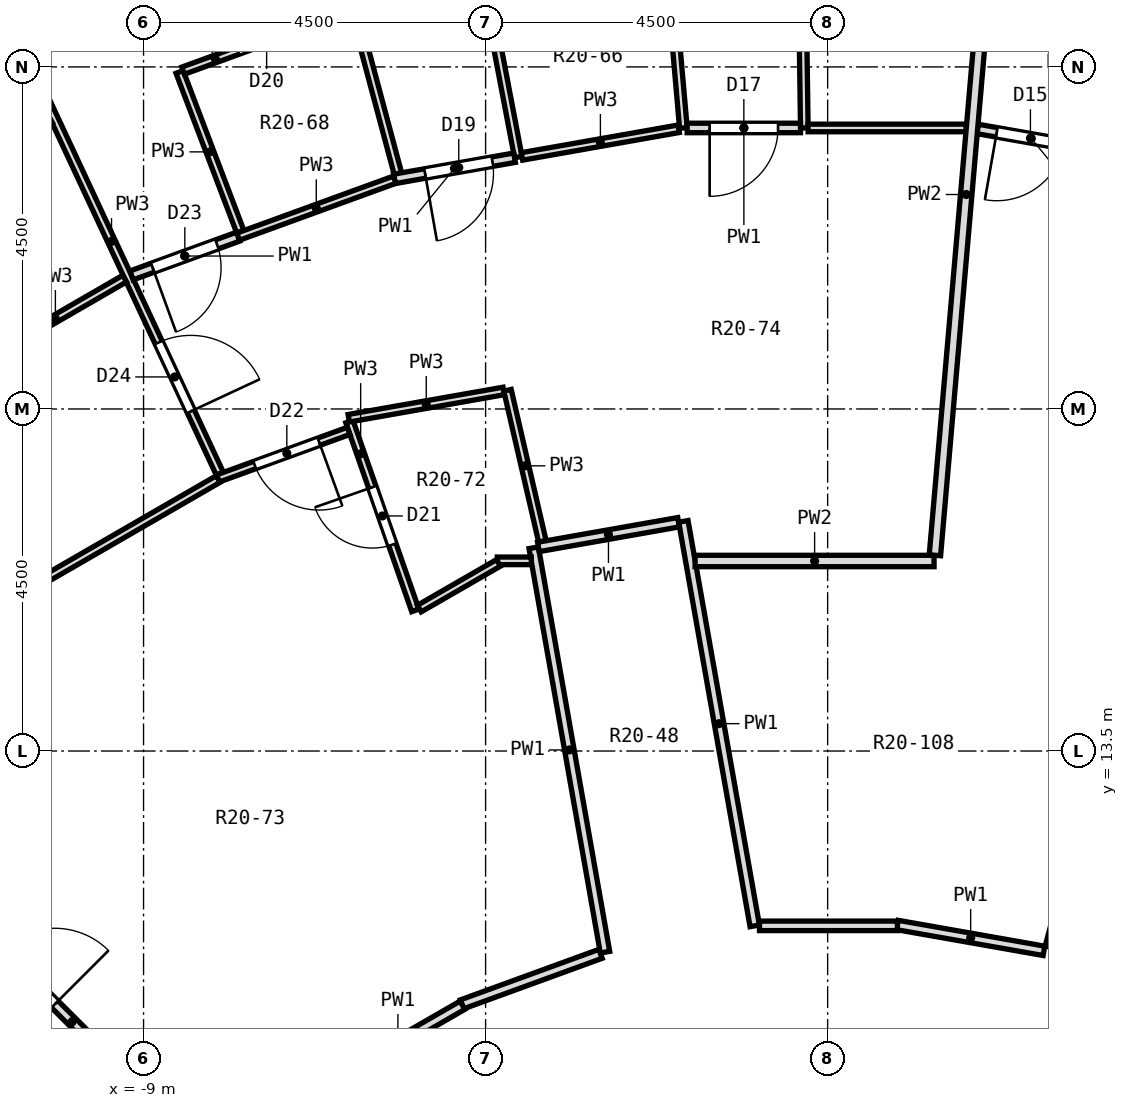
"""IFC4 building model, lengths in metres.
Left out: names, types, materials, properties, quantities, classifications, styles, units other than length and angle.
Written with IfcOpenShell. Run it as: python <this file> out.ifc"""

import sys

from ifc_helpers import new_model, si_unit, direction, frame, frame_2d, origin, place, context, subcontext, project, spatial, rectangle, extrude, element, fill, save


model = new_model("IFC4")
c1 = context("Model", 3, precision=1e-05, world=origin(), true_north=direction((0.0, 1.0)))
c2 = subcontext(c1, "Body", "Model", "MODEL_VIEW")
j1 = project(units=[si_unit("LENGTHUNIT", "METRE"), si_unit("PLANEANGLEUNIT", "RADIAN")], contexts=[c1])
p1 = place(None, origin())
s1 = spatial("IfcSite", under=j1, at=p1, CompositionType="ELEMENT")
p2 = place(p1, origin())
s2 = spatial("IfcBuilding", under=s1, at=p2, CompositionType="ELEMENT")
p3 = place(p2, frame((0.0, 0.0, 121.6)))
s3 = spatial("IfcBuildingStorey", under=s2, at=p3, CompositionType="ELEMENT", Elevation=121.6)
p4 = place(p3, frame((-0.339, 23.997, 0.0), z_axis=(0.0, 0.0, 1.0), x_axis=(0.014009876351, -0.999901856866, 0.0)))
e1 = element("IfcWall", 1, at=p4, inside=s3, PredefinedType="PARTITIONING", context=c2, shape_type="SweptSolid", body=[
    extrude(rectangle(XDim=2.3, YDim=0.1, at=frame_2d((1.15, 0.0))), origin(), (0.0, 0.0, 1.0), 2.8),
])
p5 = place(p3, frame((-2.237, 25.567, 0.0), z_axis=(0.0, 0.0, 1.0), x_axis=(0.087283097701, -0.996183547774, 0.0)))
e2 = element("IfcWall", 2, at=p5, inside=s3, PredefinedType="PARTITIONING", context=c2, shape_type="SweptSolid", body=[
    extrude(rectangle(XDim=3.885, YDim=0.1, at=frame_2d((1.943, 0.0))), origin(), (0.0, 0.0, 1.0), 2.8),
])
p6 = place(p3, frame((-3.867, 16.174, 0.0), z_axis=(0.0, 0.0, 1.0), x_axis=(0.173602314867, -0.98481583876, 0.0)))
e3 = element("IfcWall", 3, at=p6, inside=s3, PredefinedType="PARTITIONING", context=c2, shape_type="SweptSolid", body=[
    extrude(rectangle(XDim=5.403, YDim=0.125, at=frame_2d((2.702, 0.0))), origin(), (0.0, 0.0, 1.0), 2.8),
])
p7 = place(p3, frame((-1.898, 16.521, 0.0), z_axis=(0.0, 0.0, 1.0), x_axis=(0.173777601074, -0.984784923405, 0.0)))
e4 = element("IfcWall", 4, at=p7, inside=s3, PredefinedType="PARTITIONING", context=c2, shape_type="SweptSolid", body=[
    extrude(rectangle(XDim=5.403, YDim=0.125, at=frame_2d((2.702, 0.0))), origin(), (0.0, 0.0, 1.0), 2.8),
])
p8 = place(p3, frame((-4.501, 23.574, 0.0), z_axis=(0.0, 0.0, 1.0), x_axis=(0.187292523019, -0.982304184467, 0.0)))
e5 = element("IfcWall", 5, at=p8, inside=s3, PredefinedType="PARTITIONING", context=c2, shape_type="SweptSolid", body=[
    extrude(rectangle(XDim=2.301, YDim=0.1, at=frame_2d((1.15, 0.0))), origin(), (0.0, 0.0, 1.0), 2.8),
])
p9 = place(p3, frame((-4.212, 18.246, 0.0), z_axis=(0.0, 0.0, 1.0), x_axis=(0.224815815327, -0.974401277287, 0.0)))
e6 = element("IfcWall", 6, at=p9, inside=s3, PredefinedType="PARTITIONING", context=c2, shape_type="SweptSolid", body=[
    extrude(rectangle(XDim=2.041, YDim=0.1, at=frame_2d((1.02, 0.0))), origin(), (0.0, 0.0, 1.0), 2.8),
])
p10 = place(p3, frame((-6.643, 24.791, 0.0), z_axis=(0.0, 0.0, 1.0), x_axis=(0.258530300991, -0.966003148789, 0.0)))
e7 = element("IfcWall", 7, at=p10, inside=s3, PredefinedType="PARTITIONING", context=c2, shape_type="SweptSolid", body=[
    extrude(rectangle(XDim=3.835, YDim=0.1, at=frame_2d((1.917, 0.0))), origin(), (0.0, 0.0, 1.0), 2.8),
])
p11 = place(p3, frame((-6.292, 17.835, 0.0), z_axis=(0.0, 0.0, 1.0), x_axis=(0.329581778564, -0.944127031304, 0.0)))
e8 = element("IfcWall", 8, at=p11, inside=s3, PredefinedType="PARTITIONING", context=c2, shape_type="SweptSolid", body=[
    extrude(rectangle(XDim=2.632, YDim=0.1, at=frame_2d((1.316, 0.0))), origin(), (0.0, 0.0, 1.0), 2.8),
])
p12 = place(p11, frame((0.916, 0.0, 0.0)))
e9 = element("IfcOpeningElement", 9, at=p12, cuts=e8, PredefinedType="OPENING", context=c2, shape_type="SweptSolid", body=[
    extrude(rectangle(XDim=0.8, YDim=2.1, at=frame_2d((0.4, 1.05))), frame((0.0, 0.062, 0.0), z_axis=(0.0, -1.0, 0.0), x_axis=(1.0, 0.0, 0.0)), (0.0, 0.0, 1.0), 0.124),
])
p13 = place(p3, frame((-8.526, 22.434, 0.0), z_axis=(0.0, 0.0, 1.0), x_axis=(0.355151387301, -0.934808799754, 0.0)))
e10 = element("IfcWall", 10, at=p13, inside=s3, PredefinedType="PARTITIONING", context=c2, shape_type="SweptSolid", body=[
    extrude(rectangle(XDim=2.25, YDim=0.1, at=frame_2d((1.125, 0.0))), origin(), (0.0, 0.0, 1.0), 2.8),
])
p14 = place(p3, frame((-10.846, 23.26, 0.0), z_axis=(0.0, 0.0, 1.0), x_axis=(0.422617898312, -0.906307956506, 0.0)))
e11 = element("IfcWall", 11, at=p14, inside=s3, PredefinedType="PARTITIONING", context=c2, shape_type="SweptSolid", body=[
    extrude(rectangle(XDim=6.744, YDim=0.1, at=frame_2d((3.372, 0.0))), origin(), (0.0, 0.0, 1.0), 2.8),
])
p15 = place(p14, frame((4.839, 0.0, 0.0)))
e12 = element("IfcOpeningElement", 12, at=p15, cuts=e11, PredefinedType="OPENING", context=c2, shape_type="SweptSolid", body=[
    extrude(rectangle(XDim=1.0, YDim=2.1, at=frame_2d((0.5, 1.05))), frame((0.0, 0.062, 0.0), z_axis=(0.0, -1.0, 0.0), x_axis=(1.0, 0.0, 0.0)), (0.0, 0.0, 1.0), 0.124),
])
p16 = place(p3, frame((-13.086, 13.086, 0.0), z_axis=(0.0, 0.0, 1.0), x_axis=(0.707208486583, -0.707005061159, 0.0)))
e13 = element("IfcWall", 13, at=p16, inside=s3, PredefinedType="PARTITIONING", context=c2, shape_type="SweptSolid", body=[
    extrude(rectangle(XDim=7.201, YDim=0.125, at=frame_2d((3.601, 0.0))), origin(), (0.0, 0.0, 1.0), 2.8),
])
p17 = place(p16, frame((3.126, 0.0, 0.0)))
e14 = element("IfcOpeningElement", 14, at=p17, cuts=e13, PredefinedType="OPENING", context=c2, shape_type="SweptSolid", body=[
    extrude(rectangle(XDim=1.0, YDim=2.1, at=frame_2d((0.5, 1.05))), frame((0.0, 0.074, 0.0), z_axis=(0.0, -1.0, 0.0), x_axis=(1.0, 0.0, 0.0)), (0.0, 0.0, 1.0), 0.149),
])
p18 = place(p3, frame((0.917, 11.211, 0.0), z_axis=(0.0, 0.0, 1.0), x_axis=(0.984842502131, -0.173450990183, 0.0)))
e15 = element("IfcWall", 15, at=p18, inside=s3, PredefinedType="PARTITIONING", context=c2, shape_type="SweptSolid", body=[
    extrude(rectangle(XDim=1.958, YDim=0.125, at=frame_2d((0.979, 0.0))), origin(), (0.0, 0.0, 1.0), 2.8),
])
p19 = place(p3, frame((1.972, 21.684, 0.0), z_axis=(0.0, 0.0, 1.0), x_axis=(0.984843298649, -0.173446467555, 0.0)))
e16 = element("IfcWall", 16, at=p19, inside=s3, PredefinedType="PARTITIONING", context=c2, shape_type="SweptSolid", body=[
    extrude(rectangle(XDim=1.438, YDim=0.125, at=frame_2d((0.719, 0.0))), origin(), (0.0, 0.0, 1.0), 2.8),
])
p20 = place(p19, frame((0.257, 0.0, 0.0)))
e17 = element("IfcOpeningElement", 17, at=p20, cuts=e16, PredefinedType="OPENING", context=c2, shape_type="SweptSolid", body=[
    extrude(rectangle(XDim=0.9, YDim=2.1, at=frame_2d((0.45, 1.05))), frame((0.0, 0.074, 0.0), z_axis=(0.0, -1.0, 0.0), x_axis=(1.0, 0.0, 0.0)), (0.0, 0.0, 1.0), 0.149),
])
p21 = place(p3, frame((-0.896, 11.2, 0.0), z_axis=(0.0, 0.0, 1.0), x_axis=(1.0, 0.0, 0.0)))
e18 = element("IfcWall", 18, at=p21, inside=s3, PredefinedType="PARTITIONING", context=c2, shape_type="SweptSolid", body=[
    extrude(rectangle(XDim=1.814, YDim=0.125, at=frame_2d((0.907, 0.0))), origin(), (0.0, 0.0, 1.0), 2.8),
])
p22 = place(p3, frame((-4.346, 16.002, 0.0), z_axis=(0.0, 0.0, 1.0), x_axis=(1.0, 0.0, 0.0)))
e19 = element("IfcWall", 19, at=p22, inside=s3, PredefinedType="PARTITIONING", context=c2, shape_type="SweptSolid", body=[
    extrude(rectangle(XDim=0.447, YDim=0.1, at=frame_2d((0.223, 0.0))), origin(), (0.0, 0.0, 1.0), 2.8),
])
p23 = place(p3, frame((-1.743, 16.0, 0.0), z_axis=(0.0, 0.0, 1.0), x_axis=(1.0, 0.0, 0.0)))
e20 = element("IfcWall", 20, at=p23, inside=s3, PredefinedType="PARTITIONING", context=c2, shape_type="SweptSolid", body=[
    extrude(rectangle(XDim=3.143, YDim=0.15, at=frame_2d((1.572, 0.0))), origin(), (0.0, 0.0, 1.0), 2.8),
])
p24 = place(p3, frame((-0.257, 21.697, 0.0), z_axis=(0.0, 0.0, 1.0), x_axis=(1.0, 0.0, 0.0)))
e21 = element("IfcWall", 21, at=p24, inside=s3, PredefinedType="PARTITIONING", context=c2, shape_type="SweptSolid", body=[
    extrude(rectangle(XDim=2.08, YDim=0.1, at=frame_2d((1.04, 0.0))), origin(), (0.0, 0.0, 1.0), 2.8),
])
p25 = place(p3, frame((-1.848, 21.697, 0.0), z_axis=(0.0, 0.0, 1.0), x_axis=(1.0, 0.0, 0.0)))
e22 = element("IfcWall", 22, at=p25, inside=s3, PredefinedType="PARTITIONING", context=c2, shape_type="SweptSolid", body=[
    extrude(rectangle(XDim=1.491, YDim=0.125, at=frame_2d((0.746, 0.0))), origin(), (0.0, 0.0, 1.0), 2.8),
])
p26 = place(p25, frame((0.295, 0.0, 0.0)))
e23 = element("IfcOpeningElement", 23, at=p26, cuts=e22, PredefinedType="OPENING", context=c2, shape_type="SweptSolid", body=[
    extrude(rectangle(XDim=0.9, YDim=2.1, at=frame_2d((0.45, 1.05))), frame((0.0, 0.074, 0.0), z_axis=(0.0, -1.0, 0.0), x_axis=(1.0, 0.0, 0.0)), (0.0, 0.0, 1.0), 0.149),
])
p27 = place(p3, frame((-3.805, 16.185, 0.0), z_axis=(0.0, 0.0, 1.0), x_axis=(0.984829460828, 0.173525021494, 0.0)))
e24 = element("IfcWall", 24, at=p27, inside=s3, PredefinedType="PARTITIONING", context=c2, shape_type="SweptSolid", body=[
    extrude(rectangle(XDim=1.873, YDim=0.125, at=frame_2d((0.936, 0.0))), origin(), (0.0, 0.0, 1.0), 2.8),
])
p28 = place(p3, frame((-6.3, 17.878, 0.0), z_axis=(0.0, 0.0, 1.0), x_axis=(0.984823916484, 0.173556485102, 0.0)))
e25 = element("IfcWall", 25, at=p28, inside=s3, PredefinedType="PARTITIONING", context=c2, shape_type="SweptSolid", body=[
    extrude(rectangle(XDim=2.069, YDim=0.1, at=frame_2d((1.035, 0.0))), origin(), (0.0, 0.0, 1.0), 2.8),
])
p29 = place(p3, frame((-4.021, 21.323, 0.0), z_axis=(0.0, 0.0, 1.0), x_axis=(0.984822285077, 0.173565742058, 0.0)))
e26 = element("IfcWall", 26, at=p29, inside=s3, PredefinedType="PARTITIONING", context=c2, shape_type="SweptSolid", body=[
    extrude(rectangle(XDim=2.093, YDim=0.1, at=frame_2d((1.046, 0.0))), origin(), (0.0, 0.0, 1.0), 2.8),
])
p30 = place(p3, frame((-5.699, 21.027, 0.0), z_axis=(0.0, 0.0, 1.0), x_axis=(0.984843235948, 0.173446823572, 0.0)))
e27 = element("IfcWall", 27, at=p30, inside=s3, PredefinedType="PARTITIONING", context=c2, shape_type="SweptSolid", body=[
    extrude(rectangle(XDim=1.605, YDim=0.125, at=frame_2d((0.802, 0.0))), origin(), (0.0, 0.0, 1.0), 2.8),
])
p31 = place(p30, frame((0.409, 0.0, 0.0)))
e28 = element("IfcOpeningElement", 28, at=p31, cuts=e27, PredefinedType="OPENING", context=c2, shape_type="SweptSolid", body=[
    extrude(rectangle(XDim=0.9, YDim=2.1, at=frame_2d((0.45, 1.05))), frame((0.0, 0.074, 0.0), z_axis=(0.0, -1.0, 0.0), x_axis=(1.0, 0.0, 0.0)), (0.0, 0.0, 1.0), 0.149),
])
p32 = place(p3, frame((-4.811, 10.167, 0.0), z_axis=(0.0, 0.0, 1.0), x_axis=(0.939506513074, 0.34253103785, 0.0)))
e29 = element("IfcWall", 29, at=p32, inside=s3, PredefinedType="PARTITIONING", context=c2, shape_type="SweptSolid", body=[
    extrude(rectangle(XDim=1.94, YDim=0.125, at=frame_2d((0.97, 0.0))), origin(), (0.0, 0.0, 1.0), 2.8),
])
p33 = place(p3, frame((-8.023, 17.086, 0.0), z_axis=(0.0, 0.0, 1.0), x_axis=(0.93970385633, 0.341989272345, 0.0)))
e30 = element("IfcWall", 30, at=p33, inside=s3, PredefinedType="PARTITIONING", context=c2, shape_type="SweptSolid", body=[
    extrude(rectangle(XDim=1.831, YDim=0.1, at=frame_2d((0.916, 0.0))), origin(), (0.0, 0.0, 1.0), 2.8),
])
p34 = place(p33, frame((0.516, 0.0, 0.0)))
e31 = element("IfcOpeningElement", 31, at=p34, cuts=e30, PredefinedType="OPENING", context=c2, shape_type="SweptSolid", body=[
    extrude(rectangle(XDim=0.9, YDim=2.1, at=frame_2d((0.45, 1.05))), frame((0.0, 0.062, 0.0), z_axis=(0.0, -1.0, 0.0), x_axis=(1.0, 0.0, 0.0)), (0.0, 0.0, 1.0), 0.124),
])
p35 = place(p3, frame((-7.759, 20.265, 0.0), z_axis=(0.0, 0.0, 1.0), x_axis=(0.9397154993, 0.341957278581, 0.0)))
e32 = element("IfcWall", 32, at=p35, inside=s3, PredefinedType="PARTITIONING", context=c2, shape_type="SweptSolid", body=[
    extrude(rectangle(XDim=2.196, YDim=0.1, at=frame_2d((1.098, 0.0))), origin(), (0.0, 0.0, 1.0), 2.8),
])
p36 = place(p3, frame((-9.158, 19.757, 0.0), z_axis=(0.0, 0.0, 1.0), x_axis=(0.939793423488, 0.341743063087, 0.0)))
e33 = element("IfcWall", 33, at=p36, inside=s3, PredefinedType="PARTITIONING", context=c2, shape_type="SweptSolid", body=[
    extrude(rectangle(XDim=1.492, YDim=0.125, at=frame_2d((0.746, 0.0))), origin(), (0.0, 0.0, 1.0), 2.8),
])
p37 = place(p36, frame((0.296, 0.0, 0.0)))
e34 = element("IfcOpeningElement", 34, at=p37, cuts=e33, PredefinedType="OPENING", context=c2, shape_type="SweptSolid", body=[
    extrude(rectangle(XDim=0.9, YDim=2.1, at=frame_2d((0.45, 1.05))), frame((0.0, 0.074, 0.0), z_axis=(0.0, -1.0, 0.0), x_axis=(1.0, 0.0, 0.0)), (0.0, 0.0, 1.0), 0.149),
])
p38 = place(p3, frame((-8.479, 22.451, 0.0), z_axis=(0.0, 0.0, 1.0), x_axis=(0.939671413828, 0.342078403345, 0.0)))
e35 = element("IfcWall", 35, at=p38, inside=s3, PredefinedType="PARTITIONING", context=c2, shape_type="SweptSolid", body=[
    extrude(rectangle(XDim=2.338, YDim=0.1, at=frame_2d((1.169, 0.0))), origin(), (0.0, 0.0, 1.0), 2.8),
])
p39 = place(p38, frame((0.769, 0.0, 0.0)))
e36 = element("IfcOpeningElement", 36, at=p39, cuts=e35, PredefinedType="OPENING", context=c2, shape_type="SweptSolid", body=[
    extrude(rectangle(XDim=0.8, YDim=2.1, at=frame_2d((0.4, 1.05))), frame((0.0, 0.062, 0.0), z_axis=(0.0, -1.0, 0.0), x_axis=(1.0, 0.0, 0.0)), (0.0, 0.0, 1.0), 0.124),
])
p40 = place(p3, frame((-6.502, 9.177, 0.0), z_axis=(0.0, 0.0, 1.0), x_axis=(0.866328596722, 0.499474486338, 0.0)))
e37 = element("IfcWall", 37, at=p40, inside=s3, PredefinedType="PARTITIONING", context=c2, shape_type="SweptSolid", body=[
    extrude(rectangle(XDim=1.96, YDim=0.125, at=frame_2d((0.98, 0.0))), origin(), (0.0, 0.0, 1.0), 2.8),
])
p41 = place(p3, frame((-5.372, 15.374, 0.0), z_axis=(0.0, 0.0, 1.0), x_axis=(0.866111216017, 0.499851339389, 0.0)))
e38 = element("IfcWall", 38, at=p41, inside=s3, PredefinedType="PARTITIONING", context=c2, shape_type="SweptSolid", body=[
    extrude(rectangle(XDim=1.202, YDim=0.1, at=frame_2d((0.601, 0.0))), origin(), (0.0, 0.0, 1.0), 2.8),
])
p42 = place(p3, frame((-10.868, 15.433, 0.0), z_axis=(0.0, 0.0, 1.0), x_axis=(0.866020017222, 0.500009329683, 0.0)))
e39 = element("IfcWall", 39, at=p42, inside=s3, PredefinedType="PARTITIONING", context=c2, shape_type="SweptSolid", body=[
    extrude(rectangle(XDim=3.291, YDim=0.1, at=frame_2d((1.645, 0.0))), origin(), (0.0, 0.0, 1.0), 2.8),
])
p43 = place(p3, frame((-11.071, 18.662, 0.0), z_axis=(0.0, 0.0, 1.0), x_axis=(0.865870655861, 0.50026793553, 0.0)))
e40 = element("IfcWall", 40, at=p43, inside=s3, PredefinedType="PARTITIONING", context=c2, shape_type="SweptSolid", body=[
    extrude(rectangle(XDim=2.105, YDim=0.1, at=frame_2d((1.052, 0.0))), origin(), (0.0, 0.0, 1.0), 2.8),
])
p44 = place(p3, frame((-12.249, 20.638, 0.0), z_axis=(0.0, 0.0, 1.0), x_axis=(0.866076057046, 0.499912255713, 0.0)))
e41 = element("IfcWall", 41, at=p44, inside=s3, PredefinedType="PARTITIONING", context=c2, shape_type="SweptSolid", body=[
    extrude(rectangle(XDim=2.338, YDim=0.1, at=frame_2d((1.169, 0.0))), origin(), (0.0, 0.0, 1.0), 2.8),
])
p45 = place(p44, frame((0.769, 0.0, 0.0)))
e42 = element("IfcOpeningElement", 42, at=p45, cuts=e41, PredefinedType="OPENING", context=c2, shape_type="SweptSolid", body=[
    extrude(rectangle(XDim=0.8, YDim=2.1, at=frame_2d((0.4, 1.05))), frame((0.0, 0.062, 0.0), z_axis=(0.0, -1.0, 0.0), x_axis=(1.0, 0.0, 0.0)), (0.0, 0.0, 1.0), 0.124),
])
p46 = place(p3, frame((2.923, 10.921, 0.0), z_axis=(0.0, 0.0, 1.0), x_axis=(0.258837674225, 0.965920834438, 0.0)))
e43 = element("IfcWall", 43, at=p46, inside=s3, PredefinedType="PARTITIONING", context=c2, shape_type="SweptSolid", body=[
    extrude(rectangle(XDim=2.483, YDim=0.125, at=frame_2d((1.241, 0.0))), origin(), (0.0, 0.0, 1.0), 2.8),
])
p47 = place(p3, frame((1.411, 16.075, 0.0), z_axis=(0.0, 0.0, 1.0), x_axis=(0.086480343505, 0.996253557177, 0.0)))
e44 = element("IfcWall", 44, at=p47, inside=s3, PredefinedType="PARTITIONING", context=c2, shape_type="SweptSolid", body=[
    extrude(rectangle(XDim=9.528, YDim=0.15, at=frame_2d((4.764, 0.0))), origin(), (0.0, 0.0, 1.0), 2.8),
])
p48 = place(p20, frame((0.9, 0.0, 0.0), z_axis=(0.0, 0.0, 1.0), x_axis=(-1.0, 0.0, 0.0)))
e45 = element("IfcDoor", 45, at=p48, inside=s3, OperationType="SINGLE_SWING_RIGHT", PredefinedType="DOOR", context=c2, shape_type="SweptSolid", body=[
    extrude(rectangle(XDim=0.9, YDim=2.1, at=frame_2d((0.45, 1.05))), frame((0.0, 0.025, 0.0), z_axis=(0.0, -1.0, 0.0), x_axis=(1.0, 0.0, 0.0)), (0.0, 0.0, 1.0), 0.05),
])
fill(e17, e45)
p49 = place(p26, frame((0.9, 0.0, 0.0), z_axis=(0.0, 0.0, 1.0), x_axis=(-1.0, 0.0, 0.0)))
e46 = element("IfcDoor", 46, at=p49, inside=s3, OperationType="SINGLE_SWING_RIGHT", PredefinedType="DOOR", context=c2, shape_type="SweptSolid", body=[
    extrude(rectangle(XDim=0.9, YDim=2.1, at=frame_2d((0.45, 1.05))), frame((0.0, 0.025, 0.0), z_axis=(0.0, -1.0, 0.0), x_axis=(1.0, 0.0, 0.0)), (0.0, 0.0, 1.0), 0.05),
])
fill(e23, e46)
p50 = place(p31, frame((0.9, 0.0, 0.0), z_axis=(0.0, 0.0, 1.0), x_axis=(-1.0, 0.0, 0.0)))
e47 = element("IfcDoor", 47, at=p50, inside=s3, OperationType="SINGLE_SWING_RIGHT", PredefinedType="DOOR", context=c2, shape_type="SweptSolid", body=[
    extrude(rectangle(XDim=0.9, YDim=2.1, at=frame_2d((0.45, 1.05))), frame((0.0, 0.025, 0.0), z_axis=(0.0, -1.0, 0.0), x_axis=(1.0, 0.0, 0.0)), (0.0, 0.0, 1.0), 0.05),
])
fill(e28, e47)
p51 = place(p39, origin())
e48 = element("IfcDoor", 48, at=p51, inside=s3, OperationType="SINGLE_SWING_LEFT", PredefinedType="DOOR", context=c2, shape_type="SweptSolid", body=[
    extrude(rectangle(XDim=0.8, YDim=2.1, at=frame_2d((0.4, 1.05))), frame((0.0, 0.025, 0.0), z_axis=(0.0, -1.0, 0.0), x_axis=(1.0, 0.0, 0.0)), (0.0, 0.0, 1.0), 0.05),
])
fill(e36, e48)
p52 = place(p12, frame((0.8, 0.0, 0.0), z_axis=(0.0, 0.0, 1.0), x_axis=(-1.0, 0.0, 0.0)))
e49 = element("IfcDoor", 49, at=p52, inside=s3, OperationType="SINGLE_SWING_RIGHT", PredefinedType="DOOR", context=c2, shape_type="SweptSolid", body=[
    extrude(rectangle(XDim=0.8, YDim=2.1, at=frame_2d((0.4, 1.05))), frame((0.0, 0.025, 0.0), z_axis=(0.0, -1.0, 0.0), x_axis=(1.0, 0.0, 0.0)), (0.0, 0.0, 1.0), 0.05),
])
fill(e9, e49)
p53 = place(p34, frame((0.9, 0.0, 0.0), z_axis=(0.0, 0.0, 1.0), x_axis=(-1.0, 0.0, 0.0)))
e50 = element("IfcDoor", 50, at=p53, inside=s3, OperationType="SINGLE_SWING_LEFT", PredefinedType="DOOR", context=c2, shape_type="SweptSolid", body=[
    extrude(rectangle(XDim=0.9, YDim=2.1, at=frame_2d((0.45, 1.05))), frame((0.0, 0.025, 0.0), z_axis=(0.0, -1.0, 0.0), x_axis=(1.0, 0.0, 0.0)), (0.0, 0.0, 1.0), 0.05),
])
fill(e31, e50)
p54 = place(p37, frame((0.9, 0.0, 0.0), z_axis=(0.0, 0.0, 1.0), x_axis=(-1.0, 0.0, 0.0)))
e51 = element("IfcDoor", 51, at=p54, inside=s3, OperationType="SINGLE_SWING_RIGHT", PredefinedType="DOOR", context=c2, shape_type="SweptSolid", body=[
    extrude(rectangle(XDim=0.9, YDim=2.1, at=frame_2d((0.45, 1.05))), frame((0.0, 0.025, 0.0), z_axis=(0.0, -1.0, 0.0), x_axis=(1.0, 0.0, 0.0)), (0.0, 0.0, 1.0), 0.05),
])
fill(e34, e51)
p55 = place(p15, origin())
e52 = element("IfcDoor", 52, at=p55, inside=s3, OperationType="SINGLE_SWING_RIGHT", PredefinedType="DOOR", context=c2, shape_type="SweptSolid", body=[
    extrude(rectangle(XDim=1.0, YDim=2.1, at=frame_2d((0.5, 1.05))), frame((0.0, 0.025, 0.0), z_axis=(0.0, -1.0, 0.0), x_axis=(1.0, 0.0, 0.0)), (0.0, 0.0, 1.0), 0.05),
])
fill(e12, e52)
p56 = place(p17, origin())
e53 = element("IfcDoor", 53, at=p56, inside=s3, OperationType="SINGLE_SWING_RIGHT", PredefinedType="DOOR", context=c2, shape_type="SweptSolid", body=[
    extrude(rectangle(XDim=1.0, YDim=2.1, at=frame_2d((0.5, 1.05))), frame((0.0, 0.025, 0.0), z_axis=(0.0, -1.0, 0.0), x_axis=(1.0, 0.0, 0.0)), (0.0, 0.0, 1.0), 0.05),
])
fill(e14, e53)
save(model, sys.argv[1])
